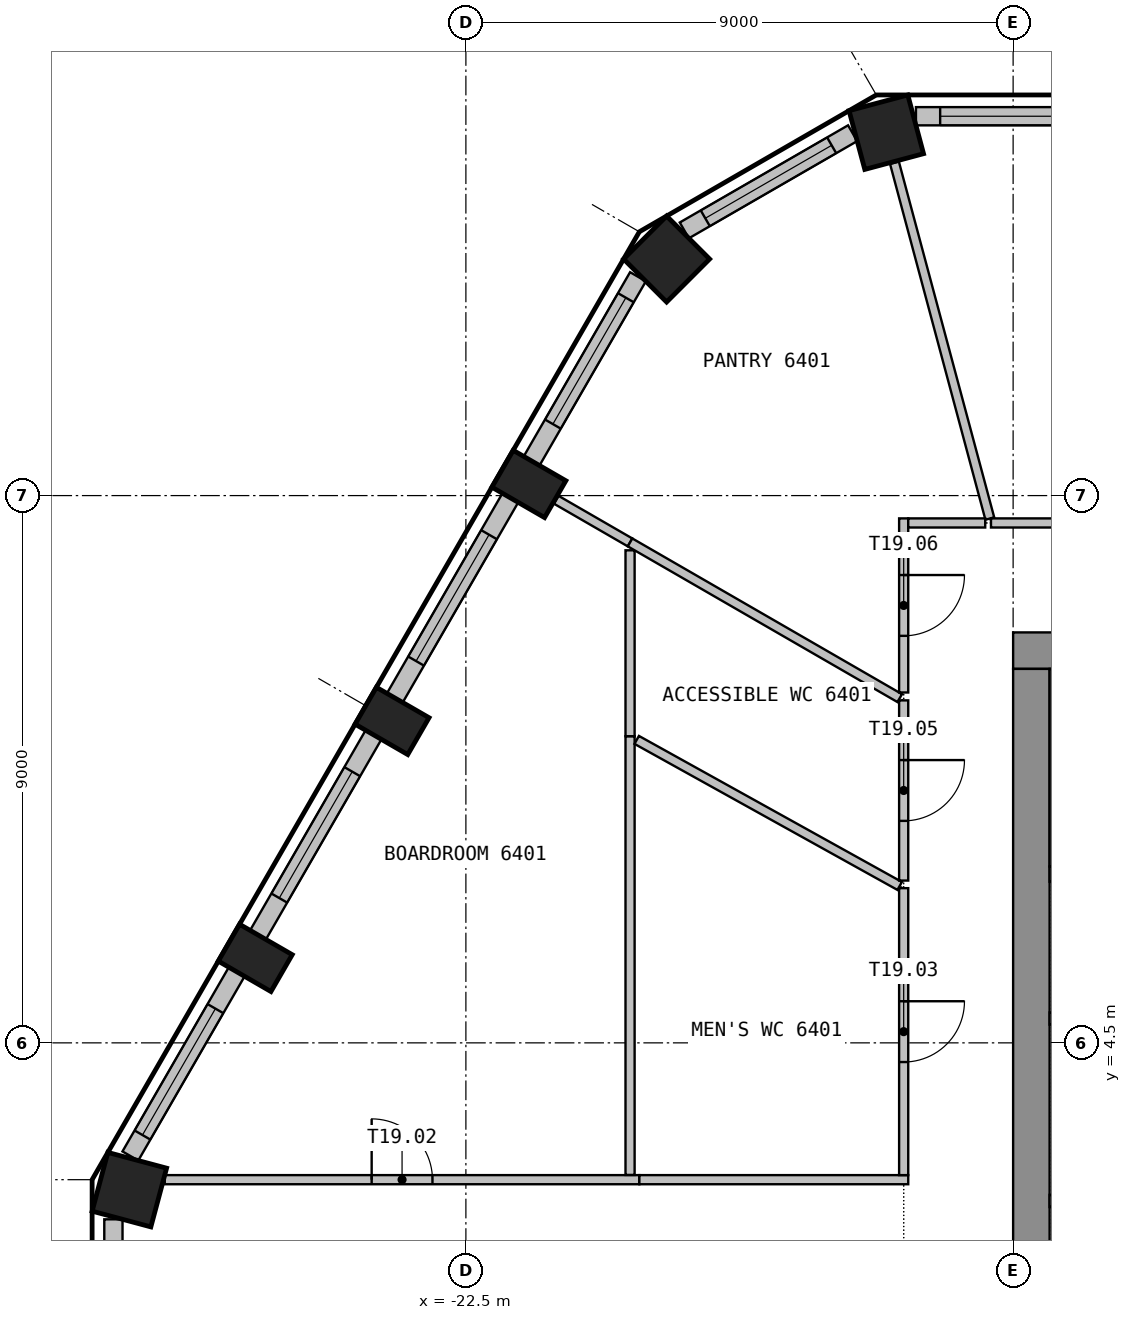
"""IFC4 building model, lengths in metres.
Left out: names, types, materials, properties, quantities, classifications, styles, units other than length and angle.
Written with IfcOpenShell. Run it as: python <this file> out.ifc"""

import sys

from ifc_helpers import new_model, si_unit, direction, frame, frame_2d, origin, origin_2d, place, context, subcontext, project, spatial, rectangle, extrude, element, fill, save


model = new_model("IFC4")
c1 = context("Model", 3, precision=1e-05, world=origin(), true_north=direction((0.0, 1.0)))
c2 = subcontext(c1, "Body", "Model", "MODEL_VIEW")
j1 = project(units=[si_unit("LENGTHUNIT", "METRE"), si_unit("PLANEANGLEUNIT", "RADIAN")], contexts=[c1])
p1 = place(None, origin())
s1 = spatial("IfcSite", under=j1, at=p1, CompositionType="ELEMENT")
p2 = place(p1, origin())
s2 = spatial("IfcBuilding", under=s1, at=p2, CompositionType="ELEMENT")
p3 = place(p2, frame((0.0, 0.0, 258.6)))
s3 = spatial("IfcBuildingStorey", under=s2, at=p3, CompositionType="ELEMENT", Elevation=258.6)
for number, where, z_axis, x_axis in (
    (1, (-15.586, 19.476, 0.0), (0.0, 0.0, 1.0), (-0.966, -0.259, 0.0)),
    (2, (-19.199, 17.39, 0.0), (0.0, 0.0, 1.0), (-0.707, -0.707, 0.0)),
):
    element("IfcColumn", number, at=place(p3, frame(where, z_axis=z_axis, x_axis=x_axis)), inside=s3, PredefinedType="COLUMN", context=c2, shape_type="SweptSolid", body=[
        extrude(rectangle(XDim=1.0, YDim=1.0, at=origin_2d()), origin(), (0.0, 0.0, 1.0), 3.575),
    ])
for number, where, z_axis, x_axis in (
    (3, (-21.464, 13.691, 0.0), (0.0, 0.0, 1.0), (-0.5, -0.866, 0.0)),
    (4, (-23.714, 9.794, 0.0), (0.0, 0.0, 1.0), (-0.5, -0.866, 0.0)),
    (5, (-25.964, 5.897, 0.0), (0.0, 0.0, 1.0), (-0.5, -0.866, 0.0)),
):
    element("IfcColumn", number, at=place(p3, frame(where, z_axis=z_axis, x_axis=x_axis)), inside=s3, PredefinedType="COLUMN", context=c2, shape_type="SweptSolid", body=[
        extrude(rectangle(XDim=0.7, YDim=1.0, at=origin_2d()), origin(), (0.0, 0.0, 1.0), 3.575),
    ])
p4 = place(p3, frame((-28.035, 2.086, 0.0), z_axis=(0.0, 0.0, 1.0), x_axis=(-0.258819045103, -0.965925826289, 0.0)))
e6 = element("IfcColumn", 6, at=p4, inside=s3, PredefinedType="COLUMN", context=c2, shape_type="SweptSolid", body=[
    extrude(rectangle(XDim=1.0, YDim=1.0, at=origin_2d()), origin(), (0.0, 0.0, 1.0), 3.575),
])
p5 = place(p3, frame((-11.601, 19.739, 0.0), z_axis=(0.0, 0.0, 1.0), x_axis=(-1.0, 0.0, 0.0)))
e7 = element("IfcWall", 7, at=p5, inside=s3, PredefinedType="SOLIDWALL", context=c2, shape_type="SweptSolid", body=[
    extrude(rectangle(XDim=3.498, YDim=0.3, at=frame_2d((1.749, 0.0))), origin(), (0.0, 0.0, 1.0), 3.575),
])
p6 = place(p5, frame((0.699, 0.0, 0.9)))
e8 = element("IfcOpeningElement", 8, at=p6, cuts=e7, PredefinedType="OPENING", context=c2, shape_type="SweptSolid", body=[
    extrude(rectangle(XDim=2.4, YDim=2.1, at=frame_2d((1.2, 1.05))), frame((0.0, 0.16, 0.0), z_axis=(0.0, -1.0, 0.0), x_axis=(1.0, 0.0, 0.0)), (0.0, 0.0, 1.0), 0.32),
])
p7 = place(p3, frame((-16.14, 19.459, 0.0), z_axis=(0.0, 0.0, 1.0), x_axis=(-0.866025316205, -0.500000151692, 0.0)))
e9 = element("IfcWall", 9, at=p7, inside=s3, PredefinedType="SOLIDWALL", context=c2, shape_type="SweptSolid", body=[
    extrude(rectangle(XDim=3.196, YDim=0.3, at=frame_2d((1.598, 0.0))), origin(), (0.0, 0.0, 1.0), 3.575),
])
p8 = place(p7, frame((0.398, 0.0, 0.9)))
e10 = element("IfcOpeningElement", 10, at=p8, cuts=e9, PredefinedType="OPENING", context=c2, shape_type="SweptSolid", body=[
    extrude(rectangle(XDim=2.4, YDim=2.1, at=frame_2d((1.2, 1.05))), frame((0.0, 0.16, 0.0), z_axis=(0.0, -1.0, 0.0), x_axis=(1.0, 0.0, 0.0)), (0.0, 0.0, 1.0), 0.32),
])
p9 = place(p3, frame((-19.67, 17.099, 0.0), z_axis=(0.0, 0.0, 1.0), x_axis=(-0.499960102815, -0.866048437209, 0.0)))
e11 = element("IfcWall", 11, at=p9, inside=s3, PredefinedType="SOLIDWALL", context=c2, shape_type="SweptSolid", body=[
    extrude(rectangle(XDim=3.498, YDim=0.3, at=frame_2d((1.749, 0.0))), origin(), (0.0, 0.0, 1.0), 3.575),
])
p10 = place(p9, frame((0.398, 0.0, 0.9)))
e12 = element("IfcOpeningElement", 12, at=p10, cuts=e11, PredefinedType="OPENING", context=c2, shape_type="SweptSolid", body=[
    extrude(rectangle(XDim=2.4, YDim=2.1, at=frame_2d((1.2, 1.05))), frame((0.0, 0.16, 0.0), z_axis=(0.0, -1.0, 0.0), x_axis=(1.0, 0.0, 0.0)), (0.0, 0.0, 1.0), 0.32),
])
p11 = place(p3, frame((-21.769, 13.463, 0.0), z_axis=(0.0, 0.0, 1.0), x_axis=(-0.499982058975, -0.866035761792, 0.0)))
e13 = element("IfcWall", 13, at=p11, inside=s3, PredefinedType="SOLIDWALL", context=c2, shape_type="SweptSolid", body=[
    extrude(rectangle(XDim=3.799, YDim=0.3, at=frame_2d((1.899, 0.0))), origin(), (0.0, 0.0, 1.0), 3.575),
])
p12 = place(p11, frame((0.699, 0.0, 0.9)))
e14 = element("IfcOpeningElement", 14, at=p12, cuts=e13, PredefinedType="OPENING", context=c2, shape_type="SweptSolid", body=[
    extrude(rectangle(XDim=2.4, YDim=2.1, at=frame_2d((1.2, 1.05))), frame((0.0, 0.16, 0.0), z_axis=(0.0, -1.0, 0.0), x_axis=(1.0, 0.0, 0.0)), (0.0, 0.0, 1.0), 0.32),
])
p13 = place(p3, frame((-24.019, 9.566, 0.0), z_axis=(0.0, 0.0, 1.0), x_axis=(-0.499982058975, -0.866035761792, 0.0)))
e15 = element("IfcWall", 15, at=p13, inside=s3, PredefinedType="SOLIDWALL", context=c2, shape_type="SweptSolid", body=[
    extrude(rectangle(XDim=3.799, YDim=0.3, at=frame_2d((1.899, 0.0))), origin(), (0.0, 0.0, 1.0), 3.575),
])
p14 = place(p13, frame((0.699, 0.0, 0.9)))
e16 = element("IfcOpeningElement", 16, at=p14, cuts=e15, PredefinedType="OPENING", context=c2, shape_type="SweptSolid", body=[
    extrude(rectangle(XDim=2.4, YDim=2.1, at=frame_2d((1.2, 1.05))), frame((0.0, 0.16, 0.0), z_axis=(0.0, -1.0, 0.0), x_axis=(1.0, 0.0, 0.0)), (0.0, 0.0, 1.0), 0.32),
])
p15 = place(p3, frame((-26.269, 5.669, 0.0), z_axis=(0.0, 0.0, 1.0), x_axis=(-0.499990325971, -0.866030989016, 0.0)))
e17 = element("IfcWall", 17, at=p15, inside=s3, PredefinedType="SOLIDWALL", context=c2, shape_type="SweptSolid", body=[
    extrude(rectangle(XDim=3.498, YDim=0.3, at=frame_2d((1.749, 0.0))), origin(), (0.0, 0.0, 1.0), 3.575),
])
p16 = place(p15, frame((0.699, 0.0, 0.9)))
e18 = element("IfcOpeningElement", 18, at=p16, cuts=e17, PredefinedType="OPENING", context=c2, shape_type="SweptSolid", body=[
    extrude(rectangle(XDim=2.4, YDim=2.1, at=frame_2d((1.2, 1.05))), frame((0.0, 0.16, 0.0), z_axis=(0.0, -1.0, 0.0), x_axis=(1.0, 0.0, 0.0)), (0.0, 0.0, 1.0), 0.32),
])
p17 = place(p3, frame((-28.297, 1.598, 0.0), z_axis=(0.0, 0.0, 1.0), x_axis=(0.0, -1.0, 0.0)))
e19 = element("IfcWall", 19, at=p17, inside=s3, PredefinedType="SOLIDWALL", context=c2, shape_type="SweptSolid", body=[
    extrude(rectangle(XDim=3.196, YDim=0.3, at=frame_2d((1.598, 0.0))), origin(), (0.0, 0.0, 1.0), 3.575),
])
p18 = place(p17, frame((0.398, 0.0, 0.9)))
e20 = element("IfcOpeningElement", 20, at=p18, cuts=e19, PredefinedType="OPENING", context=c2, shape_type="SweptSolid", body=[
    extrude(rectangle(XDim=2.4, YDim=2.1, at=frame_2d((1.2, 1.05))), frame((0.0, 0.16, 0.0), z_axis=(0.0, -1.0, 0.0), x_axis=(1.0, 0.0, 0.0)), (0.0, 0.0, 1.0), 0.32),
])
p19 = place(p3, frame((-13.5, 10.95, 0.0), z_axis=(0.0, 0.0, 1.0), x_axis=(1.0, 0.0, 0.0)))
e21 = element("IfcWall", 21, at=p19, inside=s3, PredefinedType="SHEAR", context=c2, shape_type="SweptSolid", body=[
    extrude(rectangle(XDim=27.0, YDim=0.6, at=frame_2d((13.5, 0.0))), origin(), (0.0, 0.0, 1.0), 3.575),
])
p20 = place(p19, frame((12.3, 0.0, 0.0)))
e22 = element("IfcOpeningElement", 22, at=p20, cuts=e21, PredefinedType="OPENING", context=c2, shape_type="SweptSolid", body=[
    extrude(rectangle(XDim=2.4, YDim=2.1, at=frame_2d((1.2, 1.05))), frame((0.0, 0.31, 0.0), z_axis=(0.0, -1.0, 0.0), x_axis=(1.0, 0.0, 0.0)), (0.0, 0.0, 1.0), 0.62),
])
p21 = place(p19, frame((1.05, 0.0, 0.0)))
e23 = element("IfcOpeningElement", 23, at=p21, cuts=e21, PredefinedType="OPENING", context=c2, shape_type="SweptSolid", body=[
    extrude(rectangle(XDim=1.2, YDim=2.1, at=frame_2d((0.6, 1.05))), frame((0.0, 0.31, 0.0), z_axis=(0.0, -1.0, 0.0), x_axis=(1.0, 0.0, 0.0)), (0.0, 0.0, 1.0), 0.62),
])
p22 = place(p19, frame((24.75, 0.0, 0.0)))
e24 = element("IfcOpeningElement", 24, at=p22, cuts=e21, PredefinedType="OPENING", context=c2, shape_type="SweptSolid", body=[
    extrude(rectangle(XDim=1.2, YDim=2.1, at=frame_2d((0.6, 1.05))), frame((0.0, 0.31, 0.0), z_axis=(0.0, -1.0, 0.0), x_axis=(1.0, 0.0, 0.0)), (0.0, 0.0, 1.0), 0.62),
])
p23 = place(p3, frame((-13.2, -10.65, 0.0), z_axis=(0.0, 0.0, 1.0), x_axis=(0.0, 1.0, 0.0)))
e25 = element("IfcWall", 25, at=p23, inside=s3, PredefinedType="SHEAR", context=c2, shape_type="SweptSolid", body=[
    extrude(rectangle(XDim=21.3, YDim=0.6, at=frame_2d((10.65, 0.0))), origin(), (0.0, 0.0, 1.0), 3.575),
])
p24 = place(p23, frame((9.45, 0.0, 0.0)))
e26 = element("IfcOpeningElement", 26, at=p24, cuts=e25, PredefinedType="OPENING", context=c2, shape_type="SweptSolid", body=[
    extrude(rectangle(XDim=2.4, YDim=2.1, at=frame_2d((1.2, 1.05))), frame((0.0, 0.31, 0.0), z_axis=(0.0, -1.0, 0.0), x_axis=(1.0, 0.0, 0.0)), (0.0, 0.0, 1.0), 0.62),
])
p25 = place(p3, frame((-12.9, 7.275, 0.0), z_axis=(0.0, 0.0, 1.0), x_axis=(1.0, 0.0, 0.0)))
e27 = element("IfcWall", 27, at=p25, inside=s3, PredefinedType="SHEAR", context=c2, shape_type="SweptSolid", body=[
    extrude(rectangle(XDim=10.1, YDim=0.25, at=frame_2d((5.05, 0.0))), origin(), (0.0, 0.0, 1.0), 3.575),
])
p26 = place(p25, frame((0.45, 0.0, 0.0)))
e28 = element("IfcOpeningElement", 28, at=p26, cuts=e27, PredefinedType="OPENING", context=c2, shape_type="SweptSolid", body=[
    extrude(rectangle(XDim=1.2, YDim=2.1, at=frame_2d((0.6, 1.05))), frame((0.0, 0.135, 0.0), z_axis=(0.0, -1.0, 0.0), x_axis=(1.0, 0.0, 0.0)), (0.0, 0.0, 1.0), 0.27),
])
p27 = place(p3, frame((-12.775, 7.4, 0.0), z_axis=(0.0, 0.0, 1.0), x_axis=(0.0, 1.0, 0.0)))
e29 = element("IfcWall", 29, at=p27, inside=s3, PredefinedType="SHEAR", context=c2, shape_type="SweptSolid", body=[
    extrude(rectangle(XDim=3.25, YDim=0.25, at=frame_2d((1.625, 0.0))), origin(), (0.0, 0.0, 1.0), 3.575),
])
p28 = place(p3, frame((-12.9, 1.9, 0.0), z_axis=(0.0, 0.0, 1.0), x_axis=(1.0, 0.0, 0.0)))
e30 = element("IfcWall", 30, at=p28, inside=s3, PredefinedType="PARTITIONING", context=c2, shape_type="SweptSolid", body=[
    extrude(rectangle(XDim=11.375, YDim=0.2, at=frame_2d((5.688, 0.0))), origin(), (0.0, 0.0, 1.0), 3.575),
])
p29 = place(p28, frame((2.244, 0.0, 0.0)))
e31 = element("IfcOpeningElement", 31, at=p29, cuts=e30, PredefinedType="OPENING", context=c2, shape_type="SweptSolid", body=[
    extrude(rectangle(XDim=1.2, YDim=2.1, at=frame_2d((0.6, 1.05))), frame((0.0, 0.11, 0.0), z_axis=(0.0, -1.0, 0.0), x_axis=(1.0, 0.0, 0.0)), (0.0, 0.0, 1.0), 0.22),
])
p30 = place(p28, frame((7.931, 0.0, 0.0)))
e32 = element("IfcOpeningElement", 32, at=p30, cuts=e30, PredefinedType="OPENING", context=c2, shape_type="SweptSolid", body=[
    extrude(rectangle(XDim=1.2, YDim=2.1, at=frame_2d((0.6, 1.05))), frame((0.0, 0.11, 0.0), z_axis=(0.0, -1.0, 0.0), x_axis=(1.0, 0.0, 0.0)), (0.0, 0.0, 1.0), 0.22),
])
p31 = place(p3, frame((-12.9, 4.9, 0.0), z_axis=(0.0, 0.0, 1.0), x_axis=(1.0, 0.0, 0.0)))
e33 = element("IfcWall", 33, at=p31, inside=s3, PredefinedType="PARTITIONING", context=c2, shape_type="SweptSolid", body=[
    extrude(rectangle(XDim=11.375, YDim=0.2, at=frame_2d((5.688, 0.0))), origin(), (0.0, 0.0, 1.0), 3.575),
])
p32 = place(p3, frame((-27.452, 2.25, 0.0), z_axis=(0.0, 0.0, 1.0), x_axis=(1.0, 0.0, 0.0)))
e34 = element("IfcWall", 34, at=p32, inside=s3, PredefinedType="PARTITIONING", context=c2, shape_type="SweptSolid", body=[
    extrude(rectangle(XDim=7.805, YDim=0.15, at=frame_2d((3.903, 0.0))), origin(), (0.0, 0.0, 1.0), 3.575),
])
p33 = place(p32, frame((3.403, 0.0, 0.0)))
e35 = element("IfcOpeningElement", 35, at=p33, cuts=e34, PredefinedType="OPENING", context=c2, shape_type="SweptSolid", body=[
    extrude(rectangle(XDim=1.0, YDim=2.1, at=frame_2d((0.5, 1.05))), frame((0.0, 0.085, 0.0), z_axis=(0.0, -1.0, 0.0), x_axis=(1.0, 0.0, 0.0)), (0.0, 0.0, 1.0), 0.17),
])
p34 = place(p3, frame((-21.014, 13.431, 0.0), z_axis=(0.0, 0.0, 1.0), x_axis=(0.865918715181, -0.500184744569, 0.0)))
e36 = element("IfcWall", 36, at=p34, inside=s3, PredefinedType="PARTITIONING", context=c2, shape_type="SweptSolid", body=[
    extrude(rectangle(XDim=1.402, YDim=0.15, at=frame_2d((0.701, 0.0))), origin(), (0.0, 0.0, 1.0), 3.575),
])
p35 = place(p3, frame((-19.8, 9.543, 0.0), z_axis=(0.0, 0.0, 1.0), x_axis=(0.0, -1.0, 0.0)))
e37 = element("IfcWall", 37, at=p35, inside=s3, PredefinedType="PARTITIONING", context=c2, shape_type="SweptSolid", body=[
    extrude(rectangle(XDim=7.215, YDim=0.15, at=frame_2d((3.607, 0.0))), origin(), (0.0, 0.0, 1.0), 3.575),
])
p36 = place(p3, frame((-19.8, 12.6, 0.0), z_axis=(0.0, 0.0, 1.0), x_axis=(0.0, -1.0, 0.0)))
e38 = element("IfcWall", 38, at=p36, inside=s3, PredefinedType="PARTITIONING", context=c2, shape_type="SweptSolid", body=[
    extrude(rectangle(XDim=3.057, YDim=0.15, at=frame_2d((1.529, 0.0))), origin(), (0.0, 0.0, 1.0), 3.575),
])
p37 = place(p3, frame((-19.691, 9.482, 0.0), z_axis=(0.0, 0.0, 1.0), x_axis=(0.874224770133, -0.485521422067, 0.0)))
e39 = element("IfcWall", 39, at=p37, inside=s3, PredefinedType="PARTITIONING", context=c2, shape_type="SweptSolid", body=[
    extrude(rectangle(XDim=4.948, YDim=0.15, at=frame_2d((2.474, 0.0))), origin(), (0.0, 0.0, 1.0), 3.575),
])
p38 = place(p3, frame((-19.8, 12.73, 0.0), z_axis=(0.0, 0.0, 1.0), x_axis=(0.866028396804, -0.499994815902, 0.0)))
e40 = element("IfcWall", 40, at=p38, inside=s3, PredefinedType="PARTITIONING", context=c2, shape_type="SweptSolid", body=[
    extrude(rectangle(XDim=5.121, YDim=0.15, at=frame_2d((2.561, 0.0))), origin(), (0.0, 0.0, 1.0), 3.575),
])
p39 = place(p3, frame((-19.647, 2.25, 0.0), z_axis=(0.0, 0.0, 1.0), x_axis=(1.0, 0.0, 0.0)))
e41 = element("IfcWall", 41, at=p39, inside=s3, PredefinedType="PARTITIONING", context=c2, shape_type="SweptSolid", body=[
    extrude(rectangle(XDim=4.422, YDim=0.15, at=frame_2d((2.211, 0.0))), origin(), (0.0, 0.0, 1.0), 3.575),
])
p40 = place(p3, frame((-15.452, 18.974, 0.0), z_axis=(0.0, 0.0, 1.0), x_axis=(0.258896568031, -0.965905050749, 0.0)))
e42 = element("IfcWall", 42, at=p40, inside=s3, PredefinedType="PARTITIONING", context=c2, shape_type="SweptSolid", body=[
    extrude(rectangle(XDim=6.058, YDim=0.15, at=frame_2d((3.029, 0.0))), origin(), (0.0, 0.0, 1.0), 3.575),
])
p41 = place(p3, frame((-15.3, 7.044, 0.0), z_axis=(0.0, 0.0, 1.0), x_axis=(0.0, -1.0, 0.0)))
e43 = element("IfcWall", 43, at=p41, inside=s3, PredefinedType="PARTITIONING", context=c2, shape_type="SweptSolid", body=[
    extrude(rectangle(XDim=4.719, YDim=0.15, at=frame_2d((2.359, 0.0))), origin(), (0.0, 0.0, 1.0), 3.575),
])
p42 = place(p41, frame((1.86, 0.0, 0.0)))
e44 = element("IfcOpeningElement", 44, at=p42, cuts=e43, PredefinedType="OPENING", context=c2, shape_type="SweptSolid", body=[
    extrude(rectangle(XDim=1.0, YDim=2.1, at=frame_2d((0.5, 1.05))), frame((0.0, 0.085, 0.0), z_axis=(0.0, -1.0, 0.0), x_axis=(1.0, 0.0, 0.0)), (0.0, 0.0, 1.0), 0.17),
])
p43 = place(p3, frame((-15.3, 10.132, 0.0), z_axis=(0.0, 0.0, 1.0), x_axis=(0.0, -1.0, 0.0)))
e45 = element("IfcWall", 45, at=p43, inside=s3, PredefinedType="PARTITIONING", context=c2, shape_type="SweptSolid", body=[
    extrude(rectangle(XDim=2.963, YDim=0.15, at=frame_2d((1.481, 0.0))), origin(), (0.0, 0.0, 1.0), 3.575),
])
p44 = place(p43, frame((0.981, 0.0, 0.0)))
e46 = element("IfcOpeningElement", 46, at=p44, cuts=e45, PredefinedType="OPENING", context=c2, shape_type="SweptSolid", body=[
    extrude(rectangle(XDim=1.0, YDim=2.1, at=frame_2d((0.5, 1.05))), frame((0.0, 0.085, 0.0), z_axis=(0.0, -1.0, 0.0), x_axis=(1.0, 0.0, 0.0)), (0.0, 0.0, 1.0), 0.17),
])
p45 = place(p3, frame((-15.3, 13.125, 0.0), z_axis=(0.0, 0.0, 1.0), x_axis=(0.0, -1.0, 0.0)))
e47 = element("IfcWall", 47, at=p45, inside=s3, PredefinedType="PARTITIONING", context=c2, shape_type="SweptSolid", body=[
    extrude(rectangle(XDim=2.863, YDim=0.15, at=frame_2d((1.432, 0.0))), origin(), (0.0, 0.0, 1.0), 3.575),
])
p46 = place(p45, frame((0.931, 0.0, 0.0)))
e48 = element("IfcOpeningElement", 48, at=p46, cuts=e47, PredefinedType="OPENING", context=c2, shape_type="SweptSolid", body=[
    extrude(rectangle(XDim=1.0, YDim=2.1, at=frame_2d((0.5, 1.05))), frame((0.0, 0.085, 0.0), z_axis=(0.0, -1.0, 0.0), x_axis=(1.0, 0.0, 0.0)), (0.0, 0.0, 1.0), 0.17),
])
p47 = place(p3, frame((-13.959, 13.05, 0.0), z_axis=(0.0, 0.0, 1.0), x_axis=(-1.0, 0.0, 0.0)))
e49 = element("IfcWall", 49, at=p47, inside=s3, PredefinedType="PARTITIONING", context=c2, shape_type="SweptSolid", body=[
    extrude(rectangle(XDim=1.266, YDim=0.15, at=frame_2d((0.633, 0.0))), origin(), (0.0, 0.0, 1.0), 3.575),
])
p48 = place(p3, frame((-2.25, 13.05, 0.0), z_axis=(0.0, 0.0, 1.0), x_axis=(-1.0, 0.0, 0.0)))
e50 = element("IfcWall", 50, at=p48, inside=s3, PredefinedType="PARTITIONING", context=c2, shape_type="SweptSolid", body=[
    extrude(rectangle(XDim=11.614, YDim=0.15, at=frame_2d((5.807, 0.0))), origin(), (0.0, 0.0, 1.0), 3.575),
])
p49 = place(p48, frame((5.307, 0.0, 0.0)))
e51 = element("IfcOpeningElement", 51, at=p49, cuts=e50, PredefinedType="OPENING", context=c2, shape_type="SweptSolid", body=[
    extrude(rectangle(XDim=1.0, YDim=2.1, at=frame_2d((0.5, 1.05))), frame((0.0, 0.085, 0.0), z_axis=(0.0, -1.0, 0.0), x_axis=(1.0, 0.0, 0.0)), (0.0, 0.0, 1.0), 0.17),
])
p50 = place(p6, origin())
e52 = element("IfcWindow", 52, at=p50, inside=s3, PartitioningType="SINGLE_PANEL", PredefinedType="WINDOW", context=c2, shape_type="SweptSolid", body=[
    extrude(rectangle(XDim=2.4, YDim=2.1, at=frame_2d((1.2, 1.05))), frame((0.0, 0.03, 0.0), z_axis=(0.0, -1.0, 0.0), x_axis=(1.0, 0.0, 0.0)), (0.0, 0.0, 1.0), 0.06),
])
fill(e8, e52)
p51 = place(p8, origin())
e53 = element("IfcWindow", 53, at=p51, inside=s3, PartitioningType="SINGLE_PANEL", PredefinedType="WINDOW", context=c2, shape_type="SweptSolid", body=[
    extrude(rectangle(XDim=2.4, YDim=2.1, at=frame_2d((1.2, 1.05))), frame((0.0, 0.03, 0.0), z_axis=(0.0, -1.0, 0.0), x_axis=(1.0, 0.0, 0.0)), (0.0, 0.0, 1.0), 0.06),
])
fill(e10, e53)
p52 = place(p10, origin())
e54 = element("IfcWindow", 54, at=p52, inside=s3, PartitioningType="SINGLE_PANEL", PredefinedType="WINDOW", context=c2, shape_type="SweptSolid", body=[
    extrude(rectangle(XDim=2.4, YDim=2.1, at=frame_2d((1.2, 1.05))), frame((0.0, 0.03, 0.0), z_axis=(0.0, -1.0, 0.0), x_axis=(1.0, 0.0, 0.0)), (0.0, 0.0, 1.0), 0.06),
])
fill(e12, e54)
p53 = place(p12, origin())
e55 = element("IfcWindow", 55, at=p53, inside=s3, PartitioningType="SINGLE_PANEL", PredefinedType="WINDOW", context=c2, shape_type="SweptSolid", body=[
    extrude(rectangle(XDim=2.4, YDim=2.1, at=frame_2d((1.2, 1.05))), frame((0.0, 0.03, 0.0), z_axis=(0.0, -1.0, 0.0), x_axis=(1.0, 0.0, 0.0)), (0.0, 0.0, 1.0), 0.06),
])
fill(e14, e55)
p54 = place(p14, origin())
e56 = element("IfcWindow", 56, at=p54, inside=s3, PartitioningType="SINGLE_PANEL", PredefinedType="WINDOW", context=c2, shape_type="SweptSolid", body=[
    extrude(rectangle(XDim=2.4, YDim=2.1, at=frame_2d((1.2, 1.05))), frame((0.0, 0.03, 0.0), z_axis=(0.0, -1.0, 0.0), x_axis=(1.0, 0.0, 0.0)), (0.0, 0.0, 1.0), 0.06),
])
fill(e16, e56)
p55 = place(p16, origin())
e57 = element("IfcWindow", 57, at=p55, inside=s3, PartitioningType="SINGLE_PANEL", PredefinedType="WINDOW", context=c2, shape_type="SweptSolid", body=[
    extrude(rectangle(XDim=2.4, YDim=2.1, at=frame_2d((1.2, 1.05))), frame((0.0, 0.03, 0.0), z_axis=(0.0, -1.0, 0.0), x_axis=(1.0, 0.0, 0.0)), (0.0, 0.0, 1.0), 0.06),
])
fill(e18, e57)
p56 = place(p33, origin())
e58 = element("IfcDoor", 58, at=p56, inside=s3, OperationType="SINGLE_SWING_RIGHT", PredefinedType="DOOR", context=c2, shape_type="SweptSolid", body=[
    extrude(rectangle(XDim=1.0, YDim=2.1, at=frame_2d((0.5, 1.05))), frame((0.0, 0.025, 0.0), z_axis=(0.0, -1.0, 0.0), x_axis=(1.0, 0.0, 0.0)), (0.0, 0.0, 1.0), 0.05),
])
fill(e35, e58)
p57 = place(p42, origin())
e59 = element("IfcDoor", 59, at=p57, inside=s3, OperationType="SINGLE_SWING_LEFT", PredefinedType="DOOR", context=c2, shape_type="SweptSolid", body=[
    extrude(rectangle(XDim=1.0, YDim=2.1, at=frame_2d((0.5, 1.05))), frame((0.0, 0.025, 0.0), z_axis=(0.0, -1.0, 0.0), x_axis=(1.0, 0.0, 0.0)), (0.0, 0.0, 1.0), 0.05),
])
fill(e44, e59)
p58 = place(p44, origin())
e60 = element("IfcDoor", 60, at=p58, inside=s3, OperationType="SINGLE_SWING_LEFT", PredefinedType="DOOR", context=c2, shape_type="SweptSolid", body=[
    extrude(rectangle(XDim=1.0, YDim=2.1, at=frame_2d((0.5, 1.05))), frame((0.0, 0.025, 0.0), z_axis=(0.0, -1.0, 0.0), x_axis=(1.0, 0.0, 0.0)), (0.0, 0.0, 1.0), 0.05),
])
fill(e46, e60)
p59 = place(p46, origin())
e61 = element("IfcDoor", 61, at=p59, inside=s3, OperationType="SINGLE_SWING_RIGHT", PredefinedType="DOOR", context=c2, shape_type="SweptSolid", body=[
    extrude(rectangle(XDim=1.0, YDim=2.1, at=frame_2d((0.5, 1.05))), frame((0.0, 0.025, 0.0), z_axis=(0.0, -1.0, 0.0), x_axis=(1.0, 0.0, 0.0)), (0.0, 0.0, 1.0), 0.05),
])
fill(e48, e61)
save(model, sys.argv[1])
